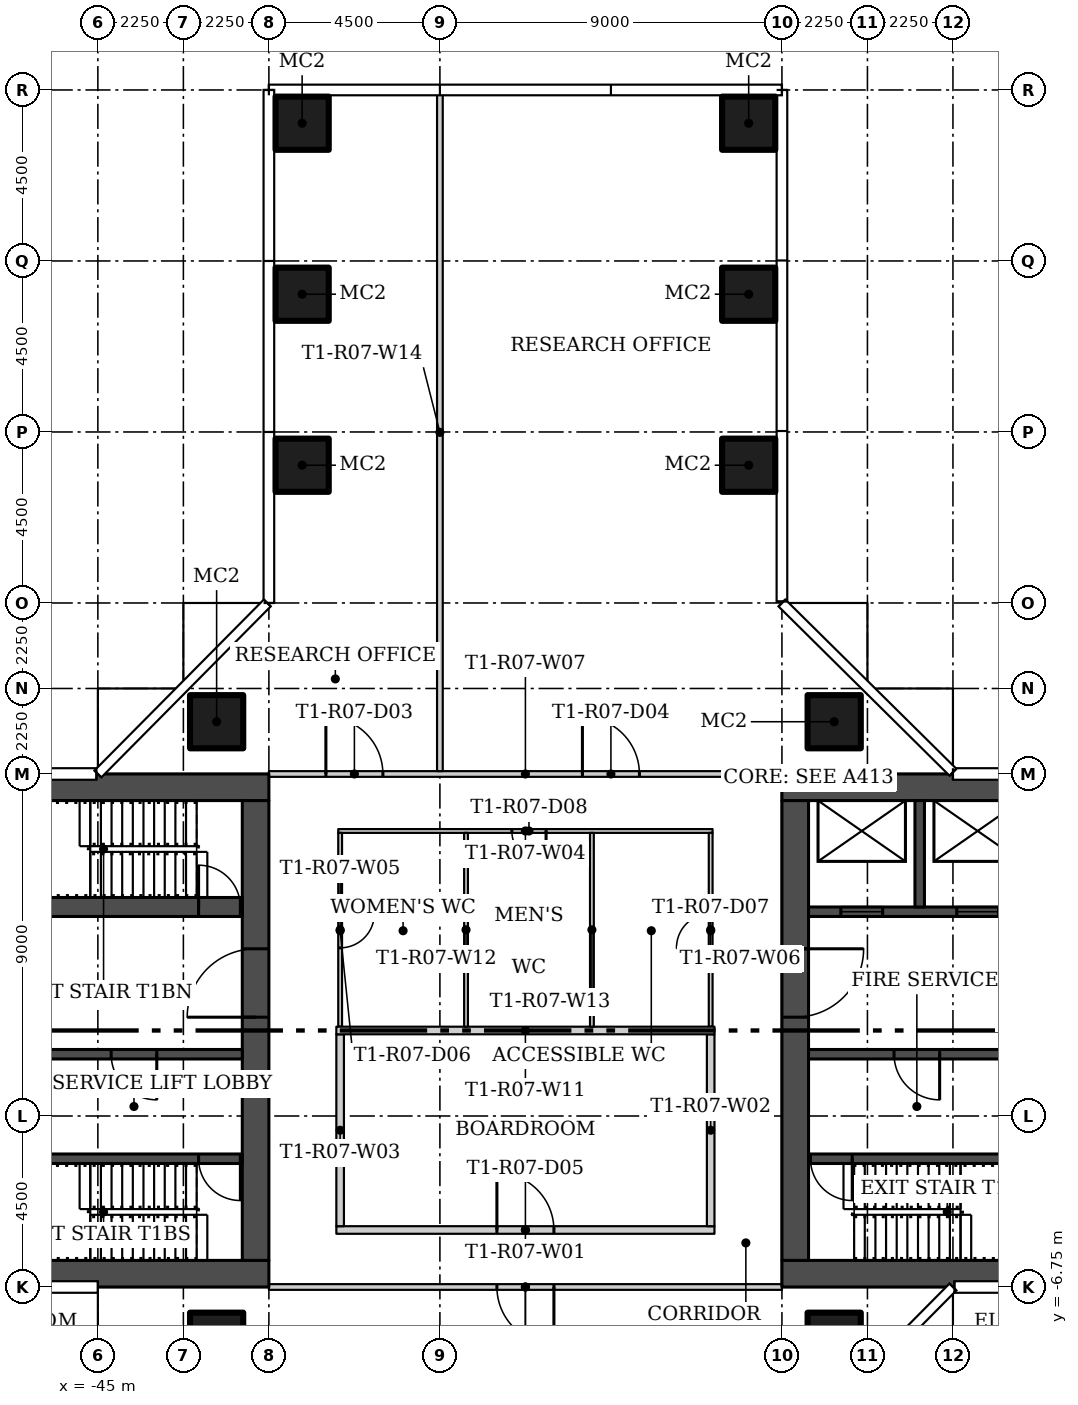
"""IFC4 building model, lengths in metres.
Left out: names, types, materials, properties, quantities, classifications, styles, units other than length and angle.
Written with IfcOpenShell. Run it as: python <this file> out.ifc"""

import sys

from ifc_helpers import new_model, si_unit, direction, frame, frame_2d, origin, origin_2d, place, context, subcontext, project, spatial, rectangle, hollow_rectangle, extrude, element, fill, save


model = new_model("IFC4")
c1 = context("Model", 3, precision=1e-05, world=origin(), true_north=direction((0.0, 1.0)))
c2 = subcontext(c1, "Body", "Model", "MODEL_VIEW")
j1 = project(units=[si_unit("LENGTHUNIT", "METRE"), si_unit("PLANEANGLEUNIT", "RADIAN")], contexts=[c1])
p1 = place(None, origin())
s1 = spatial("IfcSite", under=j1, at=p1, CompositionType="ELEMENT")
p2 = place(p1, origin())
s2 = spatial("IfcBuilding", under=s1, at=p2, CompositionType="ELEMENT")
p3 = place(p2, frame((0.0, 0.0, 73.2)))
s3 = spatial("IfcBuildingStorey", under=s2, at=p3, CompositionType="ELEMENT", Elevation=73.2)
for number, where in (
    (1, (-25.625, 8.125, 0.0)),
    (2, (-25.625, -8.125, 0.0)),
    (3, (-41.875, 8.125, 0.0)),
    (4, (-41.875, -8.125, 0.0)),
    (5, (-39.625, 14.875, 0.0)),
    (6, (-39.625, 19.375, 0.0)),
    (7, (-39.625, 23.875, 0.0)),
    (8, (-27.875, 14.875, 0.0)),
    (9, (-27.875, 19.375, 0.0)),
    (10, (-27.875, 23.875, 0.0)),
):
    element("IfcColumn", number, at=place(p3, frame(where)), inside=s3, PredefinedType="COLUMN", context=c2, shape_type="SweptSolid", body=[
        extrude(hollow_rectangle(XDim=1.4, YDim=1.4, WallThickness=0.05, at=origin_2d()), origin(), (0.0, 0.0, 1.0), 3.45),
    ])
p4 = place(p3, frame((-38.725, -5.25, 0.0)))
e11 = element("IfcWall", 11, at=p4, inside=s3, PredefinedType="PARTITIONING", context=c2, shape_type="SweptSolid", body=[
    extrude(rectangle(XDim=9.95, YDim=0.2, at=frame_2d((4.975, 0.0))), origin(), (0.0, 0.0, 1.0), 3.45),
])
p5 = place(p4, frame((4.225, 0.0, 0.0)))
e12 = element("IfcOpeningElement", 12, at=p5, cuts=e11, PredefinedType="OPENING", context=c2, shape_type="SweptSolid", body=[
    extrude(rectangle(XDim=1.5, YDim=2.4, at=frame_2d((0.75, 1.2))), frame((0.0, 0.11, 0.0), z_axis=(0.0, -1.0, 0.0), x_axis=(1.0, 0.0, 0.0)), (0.0, 0.0, 1.0), 0.22),
])
for number, where, z_axis, x_axis in (
    (13, (-28.875, -5.15, 0.0), (0.0, 0.0, 1.0), (0.0, 1.0, 0.0)),
    (14, (-38.625, -0.1, 0.0), (0.0, 0.0, 1.0), (0.0, -1.0, 0.0)),
):
    element("IfcWall", number, at=place(p3, frame(where, z_axis=z_axis, x_axis=x_axis)), inside=s3, PredefinedType="PARTITIONING", context=c2, shape_type="SweptSolid", body=[
        extrude(rectangle(XDim=5.05, YDim=0.2, at=frame_2d((2.525, 0.0))), origin(), (0.0, 0.0, 1.0), 3.45),
    ])
p6 = place(p3, frame((-28.825, 5.25, 0.0), z_axis=(0.0, 0.0, 1.0), x_axis=(-1.0, 0.0, 0.0)))
e15 = element("IfcWall", 15, at=p6, inside=s3, PredefinedType="PARTITIONING", context=c2, shape_type="SweptSolid", body=[
    extrude(rectangle(XDim=9.85, YDim=0.1, at=frame_2d((4.925, 0.0))), origin(), (0.0, 0.0, 1.0), 3.45),
])
p7 = place(p6, frame((4.381, 0.0, 0.0)))
e16 = element("IfcOpeningElement", 16, at=p7, cuts=e15, PredefinedType="OPENING", context=c2, shape_type="SweptSolid", body=[
    extrude(rectangle(XDim=0.9, YDim=2.1, at=frame_2d((0.45, 1.05))), frame((0.0, 0.06, 0.0), z_axis=(0.0, -1.0, 0.0), x_axis=(1.0, 0.0, 0.0)), (0.0, 0.0, 1.0), 0.12),
])
p8 = place(p3, frame((-38.625, 5.2, 0.0), z_axis=(0.0, 0.0, 1.0), x_axis=(0.0, -1.0, 0.0)))
e17 = element("IfcWall", 17, at=p8, inside=s3, PredefinedType="PARTITIONING", context=c2, shape_type="SweptSolid", body=[
    extrude(rectangle(XDim=5.1, YDim=0.1, at=frame_2d((2.55, 0.0))), origin(), (0.0, 0.0, 1.0), 3.45),
])
p9 = place(p8, frame((2.125, 0.0, 0.0)))
e18 = element("IfcOpeningElement", 18, at=p9, cuts=e17, PredefinedType="OPENING", context=c2, shape_type="SweptSolid", body=[
    extrude(rectangle(XDim=0.9, YDim=2.1, at=frame_2d((0.45, 1.05))), frame((0.0, 0.06, 0.0), z_axis=(0.0, -1.0, 0.0), x_axis=(1.0, 0.0, 0.0)), (0.0, 0.0, 1.0), 0.12),
])
p10 = place(p3, frame((-28.875, 0.1, 0.0), z_axis=(0.0, 0.0, 1.0), x_axis=(0.0, 1.0, 0.0)))
e19 = element("IfcWall", 19, at=p10, inside=s3, PredefinedType="PARTITIONING", context=c2, shape_type="SweptSolid", body=[
    extrude(rectangle(XDim=5.1, YDim=0.1, at=frame_2d((2.55, 0.0))), origin(), (0.0, 0.0, 1.0), 3.45),
])
p11 = place(p10, frame((2.075, 0.0, 0.0)))
e20 = element("IfcOpeningElement", 20, at=p11, cuts=e19, PredefinedType="OPENING", context=c2, shape_type="SweptSolid", body=[
    extrude(rectangle(XDim=0.9, YDim=2.1, at=frame_2d((0.45, 1.05))), frame((0.0, 0.06, 0.0), z_axis=(0.0, -1.0, 0.0), x_axis=(1.0, 0.0, 0.0)), (0.0, 0.0, 1.0), 0.12),
])
p12 = place(p3, frame((-40.5, 6.75, 0.0)))
e21 = element("IfcWall", 21, at=p12, inside=s3, PredefinedType="PARTITIONING", context=c2, shape_type="SweptSolid", body=[
    extrude(rectangle(XDim=13.5, YDim=0.15, at=frame_2d((6.75, 0.0))), origin(), (0.0, 0.0, 1.0), 3.45),
])
p13 = place(p12, frame((1.5, 0.0, 0.0)))
e22 = element("IfcOpeningElement", 22, at=p13, cuts=e21, PredefinedType="OPENING", context=c2, shape_type="SweptSolid", body=[
    extrude(rectangle(XDim=1.5, YDim=2.1, at=frame_2d((0.75, 1.05))), frame((0.0, 0.085, 0.0), z_axis=(0.0, -1.0, 0.0), x_axis=(1.0, 0.0, 0.0)), (0.0, 0.0, 1.0), 0.17),
])
p14 = place(p12, frame((8.25, 0.0, 0.0)))
e23 = element("IfcOpeningElement", 23, at=p14, cuts=e21, PredefinedType="OPENING", context=c2, shape_type="SweptSolid", body=[
    extrude(rectangle(XDim=1.5, YDim=2.1, at=frame_2d((0.75, 1.05))), frame((0.0, 0.085, 0.0), z_axis=(0.0, -1.0, 0.0), x_axis=(1.0, 0.0, 0.0)), (0.0, 0.0, 1.0), 0.17),
])
p15 = place(p3, frame((-27.0, -6.75, 0.0), z_axis=(0.0, 0.0, 1.0), x_axis=(-1.0, 0.0, 0.0)))
e24 = element("IfcWall", 24, at=p15, inside=s3, PredefinedType="PARTITIONING", context=c2, shape_type="SweptSolid", body=[
    extrude(rectangle(XDim=13.5, YDim=0.15, at=frame_2d((6.75, 0.0))), origin(), (0.0, 0.0, 1.0), 3.45),
])
p16 = place(p15, frame((6.0, 0.0, 0.0)))
e25 = element("IfcOpeningElement", 25, at=p16, cuts=e24, PredefinedType="OPENING", context=c2, shape_type="SweptSolid", body=[
    extrude(rectangle(XDim=1.5, YDim=2.1, at=frame_2d((0.75, 1.05))), frame((0.0, 0.085, 0.0), z_axis=(0.0, -1.0, 0.0), x_axis=(1.0, 0.0, 0.0)), (0.0, 0.0, 1.0), 0.17),
])
p17 = place(p3, frame((-28.775, 0.0, 0.0), z_axis=(0.0, 0.0, 1.0), x_axis=(-1.0, 0.0, 0.0)))
e26 = element("IfcWall", 26, at=p17, inside=s3, PredefinedType="PARTITIONING", context=c2, shape_type="SweptSolid", body=[
    extrude(rectangle(XDim=9.95, YDim=0.2, at=frame_2d((4.975, 0.0))), origin(), (0.0, 0.0, 1.0), 3.45),
])
for number, where, z_axis, x_axis in (
    (27, (-35.312, 0.1, 0.0), (0.0, 0.0, 1.0), (0.0, 1.0, 0.0)),
    (28, (-32.0, 0.1, 0.0), (0.0, 0.0, 1.0), (0.0, 1.0, 0.0)),
):
    element("IfcWall", number, at=place(p3, frame(where, z_axis=z_axis, x_axis=x_axis)), inside=s3, PredefinedType="PARTITIONING", context=c2, shape_type="SweptSolid", body=[
        extrude(rectangle(XDim=5.1, YDim=0.1, at=frame_2d((2.55, 0.0))), origin(), (0.0, 0.0, 1.0), 3.45),
    ])
p18 = place(p3, frame((-36.0, 6.825, 0.0), z_axis=(0.0, 0.0, 1.0), x_axis=(0.0, 1.0, 0.0)))
e29 = element("IfcWall", 29, at=p18, inside=s3, PredefinedType="PARTITIONING", context=c2, shape_type="SweptSolid", body=[
    extrude(rectangle(XDim=17.83, YDim=0.15, at=frame_2d((8.915, 0.0))), origin(), (0.0, 0.0, 1.0), 3.45),
])
for number, where in (
    (30, (-27.0, -6.4, 0.0)),
    (31, (-27.0, 6.4, 0.0)),
):
    element("IfcWall", number, at=place(p3, frame(where)), inside=s3, PredefinedType="SHEAR", context=c2, shape_type="SweptSolid", body=[
        extrude(rectangle(XDim=13.5, YDim=0.7, at=frame_2d((6.75, 0.0))), origin(), (0.0, 0.0, 1.0), 3.45),
    ])
p19 = place(p3, frame((-26.65, 6.05, 0.0), z_axis=(0.0, 0.0, 1.0), x_axis=(0.0, -1.0, 0.0)))
e32 = element("IfcWall", 32, at=p19, inside=s3, PredefinedType="SHEAR", context=c2, shape_type="SweptSolid", body=[
    extrude(rectangle(XDim=12.1, YDim=0.7, at=frame_2d((6.05, 0.0))), origin(), (0.0, 0.0, 1.0), 3.45),
])
p20 = place(p19, frame((3.9, 0.0, 0.0)))
e33 = element("IfcOpeningElement", 33, at=p20, cuts=e32, PredefinedType="OPENING", context=c2, shape_type="SweptSolid", body=[
    extrude(rectangle(XDim=1.8, YDim=2.4, at=frame_2d((0.9, 1.2))), frame((0.0, 0.36, 0.0), z_axis=(0.0, -1.0, 0.0), x_axis=(1.0, 0.0, 0.0)), (0.0, 0.0, 1.0), 0.72),
])
p21 = place(p3, frame((-14.2, -3.375, 0.0), z_axis=(0.0, 0.0, 1.0), x_axis=(-1.0, 0.0, 0.0)))
e34 = element("IfcWall", 34, at=p21, inside=s3, PredefinedType="SHEAR", context=c2, shape_type="SweptSolid", body=[
    extrude(rectangle(XDim=12.1, YDim=0.25, at=frame_2d((6.05, 0.0))), origin(), (0.0, 0.0, 1.0), 3.45),
])
p22 = place(p21, frame((10.95, 0.0, 0.0)))
e35 = element("IfcOpeningElement", 35, at=p22, cuts=e34, PredefinedType="OPENING", context=c2, shape_type="SweptSolid", body=[
    extrude(rectangle(XDim=1.1, YDim=2.1, at=frame_2d((0.55, 1.05))), frame((0.0, 0.135, 0.0), z_axis=(0.0, -1.0, 0.0), x_axis=(1.0, 0.0, 0.0)), (0.0, 0.0, 1.0), 0.27),
])
p23 = place(p3, frame((-14.2, -0.625, 0.0), z_axis=(0.0, 0.0, 1.0), x_axis=(-1.0, 0.0, 0.0)))
e36 = element("IfcWall", 36, at=p23, inside=s3, PredefinedType="SHEAR", context=c2, shape_type="SweptSolid", body=[
    extrude(rectangle(XDim=12.1, YDim=0.25, at=frame_2d((6.05, 0.0))), origin(), (0.0, 0.0, 1.0), 3.45),
])
p24 = place(p23, frame((8.65, 0.0, 0.0)))
e37 = element("IfcOpeningElement", 37, at=p24, cuts=e36, PredefinedType="OPENING", context=c2, shape_type="SweptSolid", body=[
    extrude(rectangle(XDim=1.2, YDim=2.1, at=frame_2d((0.6, 1.05))), frame((0.0, 0.135, 0.0), z_axis=(0.0, -1.0, 0.0), x_axis=(1.0, 0.0, 0.0)), (0.0, 0.0, 1.0), 0.27),
])
p25 = place(p23, frame((1.175, 0.0, 0.0)))
e38 = element("IfcOpeningElement", 38, at=p25, cuts=e36, PredefinedType="OPENING", context=c2, shape_type="SweptSolid", body=[
    extrude(rectangle(XDim=0.9, YDim=2.1, at=frame_2d((0.45, 1.05))), frame((0.0, 0.135, 0.0), z_axis=(0.0, -1.0, 0.0), x_axis=(1.0, 0.0, 0.0)), (0.0, 0.0, 1.0), 0.27),
])
p26 = place(p3, frame((-26.3, 3.125, 0.0)))
e39 = element("IfcWall", 39, at=p26, inside=s3, PredefinedType="SHEAR", context=c2, shape_type="SweptSolid", body=[
    extrude(rectangle(XDim=12.1, YDim=0.25, at=frame_2d((6.05, 0.0))), origin(), (0.0, 0.0, 1.0), 3.45),
])
p27 = place(p26, frame((0.85, 0.0, 0.0)))
e40 = element("IfcOpeningElement", 40, at=p27, cuts=e39, PredefinedType="OPENING", context=c2, shape_type="SweptSolid", body=[
    extrude(rectangle(XDim=1.1, YDim=2.1, at=frame_2d((0.55, 1.05))), frame((0.0, 0.135, 0.0), z_axis=(0.0, -1.0, 0.0), x_axis=(1.0, 0.0, 0.0)), (0.0, 0.0, 1.0), 0.27),
])
p28 = place(p26, frame((3.9, 0.0, 0.0)))
e41 = element("IfcOpeningElement", 41, at=p28, cuts=e39, PredefinedType="OPENING", context=c2, shape_type="SweptSolid", body=[
    extrude(rectangle(XDim=1.1, YDim=2.1, at=frame_2d((0.55, 1.05))), frame((0.0, 0.135, 0.0), z_axis=(0.0, -1.0, 0.0), x_axis=(1.0, 0.0, 0.0)), (0.0, 0.0, 1.0), 0.27),
])
p29 = place(p3, frame((-23.375, 3.25, 0.0), z_axis=(0.0, 0.0, 1.0), x_axis=(0.0, 1.0, 0.0)))
e42 = element("IfcWall", 42, at=p29, inside=s3, PredefinedType="SHEAR", context=c2, shape_type="SweptSolid", body=[
    extrude(rectangle(XDim=2.8, YDim=0.25, at=frame_2d((1.4, 0.0))), origin(), (0.0, 0.0, 1.0), 3.45),
])
for number, where, z_axis, x_axis in (
    (43, (-40.5, -6.4, 0.0), (0.0, 0.0, 1.0), (-1.0, 0.0, 0.0)),
    (44, (-40.5, 6.4, 0.0), (0.0, 0.0, 1.0), (-1.0, 0.0, 0.0)),
):
    element("IfcWall", number, at=place(p3, frame(where, z_axis=z_axis, x_axis=x_axis)), inside=s3, PredefinedType="SHEAR", context=c2, shape_type="SweptSolid", body=[
        extrude(rectangle(XDim=13.5, YDim=0.7, at=frame_2d((6.75, 0.0))), origin(), (0.0, 0.0, 1.0), 3.45),
    ])
p30 = place(p3, frame((-40.85, -6.05, 0.0), z_axis=(0.0, 0.0, 1.0), x_axis=(0.0, 1.0, 0.0)))
e45 = element("IfcWall", 45, at=p30, inside=s3, PredefinedType="SHEAR", context=c2, shape_type="SweptSolid", body=[
    extrude(rectangle(XDim=12.1, YDim=0.7, at=frame_2d((6.05, 0.0))), origin(), (0.0, 0.0, 1.0), 3.45),
])
p31 = place(p30, frame((6.4, 0.0, 0.0)))
e46 = element("IfcOpeningElement", 46, at=p31, cuts=e45, PredefinedType="OPENING", context=c2, shape_type="SweptSolid", body=[
    extrude(rectangle(XDim=1.8, YDim=2.4, at=frame_2d((0.9, 1.2))), frame((0.0, 0.36, 0.0), z_axis=(0.0, -1.0, 0.0), x_axis=(1.0, 0.0, 0.0)), (0.0, 0.0, 1.0), 0.72),
])
p32 = place(p3, frame((-41.2, -3.375, 0.0), z_axis=(0.0, 0.0, 1.0), x_axis=(-1.0, 0.0, 0.0)))
e47 = element("IfcWall", 47, at=p32, inside=s3, PredefinedType="SHEAR", context=c2, shape_type="SweptSolid", body=[
    extrude(rectangle(XDim=12.1, YDim=0.25, at=frame_2d((6.05, 0.0))), origin(), (0.0, 0.0, 1.0), 3.45),
])
p33 = place(p32, frame((0.05, 0.0, 0.0)))
e48 = element("IfcOpeningElement", 48, at=p33, cuts=e47, PredefinedType="OPENING", context=c2, shape_type="SweptSolid", body=[
    extrude(rectangle(XDim=1.1, YDim=2.1, at=frame_2d((0.55, 1.05))), frame((0.0, 0.135, 0.0), z_axis=(0.0, -1.0, 0.0), x_axis=(1.0, 0.0, 0.0)), (0.0, 0.0, 1.0), 0.27),
])
p34 = place(p3, frame((-41.2, -0.625, 0.0), z_axis=(0.0, 0.0, 1.0), x_axis=(-1.0, 0.0, 0.0)))
e49 = element("IfcWall", 49, at=p34, inside=s3, PredefinedType="SHEAR", context=c2, shape_type="SweptSolid", body=[
    extrude(rectangle(XDim=12.1, YDim=0.25, at=frame_2d((6.05, 0.0))), origin(), (0.0, 0.0, 1.0), 3.45),
])
p35 = place(p34, frame((2.25, 0.0, 0.0)))
e50 = element("IfcOpeningElement", 50, at=p35, cuts=e49, PredefinedType="OPENING", context=c2, shape_type="SweptSolid", body=[
    extrude(rectangle(XDim=1.2, YDim=2.1, at=frame_2d((0.6, 1.05))), frame((0.0, 0.135, 0.0), z_axis=(0.0, -1.0, 0.0), x_axis=(1.0, 0.0, 0.0)), (0.0, 0.0, 1.0), 0.27),
])
p36 = place(p34, frame((10.025, 0.0, 0.0)))
e51 = element("IfcOpeningElement", 51, at=p36, cuts=e49, PredefinedType="OPENING", context=c2, shape_type="SweptSolid", body=[
    extrude(rectangle(XDim=0.9, YDim=2.1, at=frame_2d((0.45, 1.05))), frame((0.0, 0.135, 0.0), z_axis=(0.0, -1.0, 0.0), x_axis=(1.0, 0.0, 0.0)), (0.0, 0.0, 1.0), 0.27),
])
p37 = place(p3, frame((-48.5, 3.25, 0.0)))
e52 = element("IfcWall", 52, at=p37, inside=s3, PredefinedType="SHEAR", context=c2, shape_type="SweptSolid", body=[
    extrude(rectangle(XDim=7.3, YDim=0.5, at=frame_2d((3.65, 0.0))), origin(), (0.0, 0.0, 1.0), 3.45),
])
p38 = place(p37, frame((6.15, 0.0, 0.0)))
e53 = element("IfcOpeningElement", 53, at=p38, cuts=e52, PredefinedType="OPENING", context=c2, shape_type="SweptSolid", body=[
    extrude(rectangle(XDim=1.1, YDim=2.1, at=frame_2d((0.55, 1.05))), frame((0.0, 0.26, 0.0), z_axis=(0.0, -1.0, 0.0), x_axis=(1.0, 0.0, 0.0)), (0.0, 0.0, 1.0), 0.52),
])
p39 = place(p13, origin())
e54 = element("IfcDoor", 54, at=p39, inside=s3, OperationType="DOUBLE_DOOR_SINGLE_SWING", PredefinedType="DOOR", context=c2, shape_type="SweptSolid", body=[
    extrude(rectangle(XDim=1.5, YDim=2.1, at=frame_2d((0.75, 1.05))), frame((0.0, 0.025, 0.0), z_axis=(0.0, -1.0, 0.0), x_axis=(1.0, 0.0, 0.0)), (0.0, 0.0, 1.0), 0.05),
])
fill(e22, e54)
p40 = place(p14, origin())
e55 = element("IfcDoor", 55, at=p40, inside=s3, OperationType="DOUBLE_DOOR_SINGLE_SWING", PredefinedType="DOOR", context=c2, shape_type="SweptSolid", body=[
    extrude(rectangle(XDim=1.5, YDim=2.1, at=frame_2d((0.75, 1.05))), frame((0.0, 0.025, 0.0), z_axis=(0.0, -1.0, 0.0), x_axis=(1.0, 0.0, 0.0)), (0.0, 0.0, 1.0), 0.05),
])
fill(e23, e55)
p41 = place(p5, origin())
e56 = element("IfcDoor", 56, at=p41, inside=s3, OperationType="DOUBLE_DOOR_SINGLE_SWING", PredefinedType="DOOR", context=c2, shape_type="SweptSolid", body=[
    extrude(rectangle(XDim=1.5, YDim=2.4, at=frame_2d((0.75, 1.2))), frame((0.0, 0.025, 0.0), z_axis=(0.0, -1.0, 0.0), x_axis=(1.0, 0.0, 0.0)), (0.0, 0.0, 1.0), 0.05),
])
fill(e12, e56)
p42 = place(p9, origin())
e57 = element("IfcDoor", 57, at=p42, inside=s3, OperationType="SINGLE_SWING_LEFT", PredefinedType="DOOR", context=c2, shape_type="SweptSolid", body=[
    extrude(rectangle(XDim=0.9, YDim=2.1, at=frame_2d((0.45, 1.05))), frame((0.0, 0.025, 0.0), z_axis=(0.0, -1.0, 0.0), x_axis=(1.0, 0.0, 0.0)), (0.0, 0.0, 1.0), 0.05),
])
fill(e18, e57)
p43 = place(p11, origin())
e58 = element("IfcDoor", 58, at=p43, inside=s3, OperationType="SINGLE_SWING_LEFT", PredefinedType="DOOR", context=c2, shape_type="SweptSolid", body=[
    extrude(rectangle(XDim=0.9, YDim=2.1, at=frame_2d((0.45, 1.05))), frame((0.0, 0.025, 0.0), z_axis=(0.0, -1.0, 0.0), x_axis=(1.0, 0.0, 0.0)), (0.0, 0.0, 1.0), 0.05),
])
fill(e20, e58)
p44 = place(p7, origin())
e59 = element("IfcDoor", 59, at=p44, inside=s3, OperationType="SINGLE_SWING_RIGHT", PredefinedType="DOOR", context=c2, shape_type="SweptSolid", body=[
    extrude(rectangle(XDim=0.9, YDim=2.1, at=frame_2d((0.45, 1.05))), frame((0.0, 0.025, 0.0), z_axis=(0.0, -1.0, 0.0), x_axis=(1.0, 0.0, 0.0)), (0.0, 0.0, 1.0), 0.05),
])
fill(e16, e59)
p45 = place(p16, origin())
e60 = element("IfcDoor", 60, at=p45, inside=s3, OperationType="DOUBLE_DOOR_SINGLE_SWING", PredefinedType="DOOR", context=c2, shape_type="SweptSolid", body=[
    extrude(rectangle(XDim=1.5, YDim=2.1, at=frame_2d((0.75, 1.05))), frame((0.0, 0.025, 0.0), z_axis=(0.0, -1.0, 0.0), x_axis=(1.0, 0.0, 0.0)), (0.0, 0.0, 1.0), 0.05),
])
fill(e25, e60)
p46 = place(p20, origin())
e61 = element("IfcDoor", 61, at=p46, inside=s3, OperationType="DOUBLE_DOOR_SINGLE_SWING", PredefinedType="DOOR", context=c2, shape_type="SweptSolid", body=[
    extrude(rectangle(XDim=1.8, YDim=2.4, at=frame_2d((0.9, 1.2))), frame((0.0, 0.025, 0.0), z_axis=(0.0, -1.0, 0.0), x_axis=(1.0, 0.0, 0.0)), (0.0, 0.0, 1.0), 0.05),
])
fill(e33, e61)
p47 = place(p22, origin())
e62 = element("IfcDoor", 62, at=p47, inside=s3, OperationType="SINGLE_SWING_RIGHT", PredefinedType="DOOR", context=c2, shape_type="SweptSolid", body=[
    extrude(rectangle(XDim=1.1, YDim=2.1, at=frame_2d((0.55, 1.05))), frame((0.0, 0.025, 0.0), z_axis=(0.0, -1.0, 0.0), x_axis=(1.0, 0.0, 0.0)), (0.0, 0.0, 1.0), 0.05),
])
fill(e35, e62)
p48 = place(p24, origin())
e63 = element("IfcDoor", 63, at=p48, inside=s3, OperationType="SINGLE_SWING_RIGHT", PredefinedType="DOOR", context=c2, shape_type="SweptSolid", body=[
    extrude(rectangle(XDim=1.2, YDim=2.1, at=frame_2d((0.6, 1.05))), frame((0.0, 0.025, 0.0), z_axis=(0.0, -1.0, 0.0), x_axis=(1.0, 0.0, 0.0)), (0.0, 0.0, 1.0), 0.05),
])
fill(e37, e63)
p49 = place(p27, origin())
e64 = element("IfcDoor", 64, at=p49, inside=s3, OperationType="SLIDING_TO_LEFT", PredefinedType="DOOR", context=c2, shape_type="SweptSolid", body=[
    extrude(rectangle(XDim=1.1, YDim=2.1, at=frame_2d((0.55, 1.05))), frame((0.0, 0.025, 0.0), z_axis=(0.0, -1.0, 0.0), x_axis=(1.0, 0.0, 0.0)), (0.0, 0.0, 1.0), 0.05),
])
fill(e40, e64)
p50 = place(p28, origin())
e65 = element("IfcDoor", 65, at=p50, inside=s3, OperationType="SLIDING_TO_LEFT", PredefinedType="DOOR", context=c2, shape_type="SweptSolid", body=[
    extrude(rectangle(XDim=1.1, YDim=2.1, at=frame_2d((0.55, 1.05))), frame((0.0, 0.025, 0.0), z_axis=(0.0, -1.0, 0.0), x_axis=(1.0, 0.0, 0.0)), (0.0, 0.0, 1.0), 0.05),
])
fill(e41, e65)
p51 = place(p31, origin())
e66 = element("IfcDoor", 66, at=p51, inside=s3, OperationType="DOUBLE_DOOR_SINGLE_SWING", PredefinedType="DOOR", context=c2, shape_type="SweptSolid", body=[
    extrude(rectangle(XDim=1.8, YDim=2.4, at=frame_2d((0.9, 1.2))), frame((0.0, 0.025, 0.0), z_axis=(0.0, -1.0, 0.0), x_axis=(1.0, 0.0, 0.0)), (0.0, 0.0, 1.0), 0.05),
])
fill(e46, e66)
p52 = place(p33, origin())
e67 = element("IfcDoor", 67, at=p52, inside=s3, OperationType="SINGLE_SWING_LEFT", PredefinedType="DOOR", context=c2, shape_type="SweptSolid", body=[
    extrude(rectangle(XDim=1.1, YDim=2.1, at=frame_2d((0.55, 1.05))), frame((0.0, 0.025, 0.0), z_axis=(0.0, -1.0, 0.0), x_axis=(1.0, 0.0, 0.0)), (0.0, 0.0, 1.0), 0.05),
])
fill(e48, e67)
p53 = place(p35, origin())
e68 = element("IfcDoor", 68, at=p53, inside=s3, OperationType="SINGLE_SWING_LEFT", PredefinedType="DOOR", context=c2, shape_type="SweptSolid", body=[
    extrude(rectangle(XDim=1.2, YDim=2.1, at=frame_2d((0.6, 1.05))), frame((0.0, 0.025, 0.0), z_axis=(0.0, -1.0, 0.0), x_axis=(1.0, 0.0, 0.0)), (0.0, 0.0, 1.0), 0.05),
])
fill(e50, e68)
p54 = place(p38, origin())
e69 = element("IfcDoor", 69, at=p54, inside=s3, OperationType="SINGLE_SWING_RIGHT", PredefinedType="DOOR", context=c2, shape_type="SweptSolid", body=[
    extrude(rectangle(XDim=1.1, YDim=2.1, at=frame_2d((0.55, 1.05))), frame((0.0, 0.025, 0.0), z_axis=(0.0, -1.0, 0.0), x_axis=(1.0, 0.0, 0.0)), (0.0, 0.0, 1.0), 0.05),
])
fill(e53, e69)
save(model, sys.argv[1])
